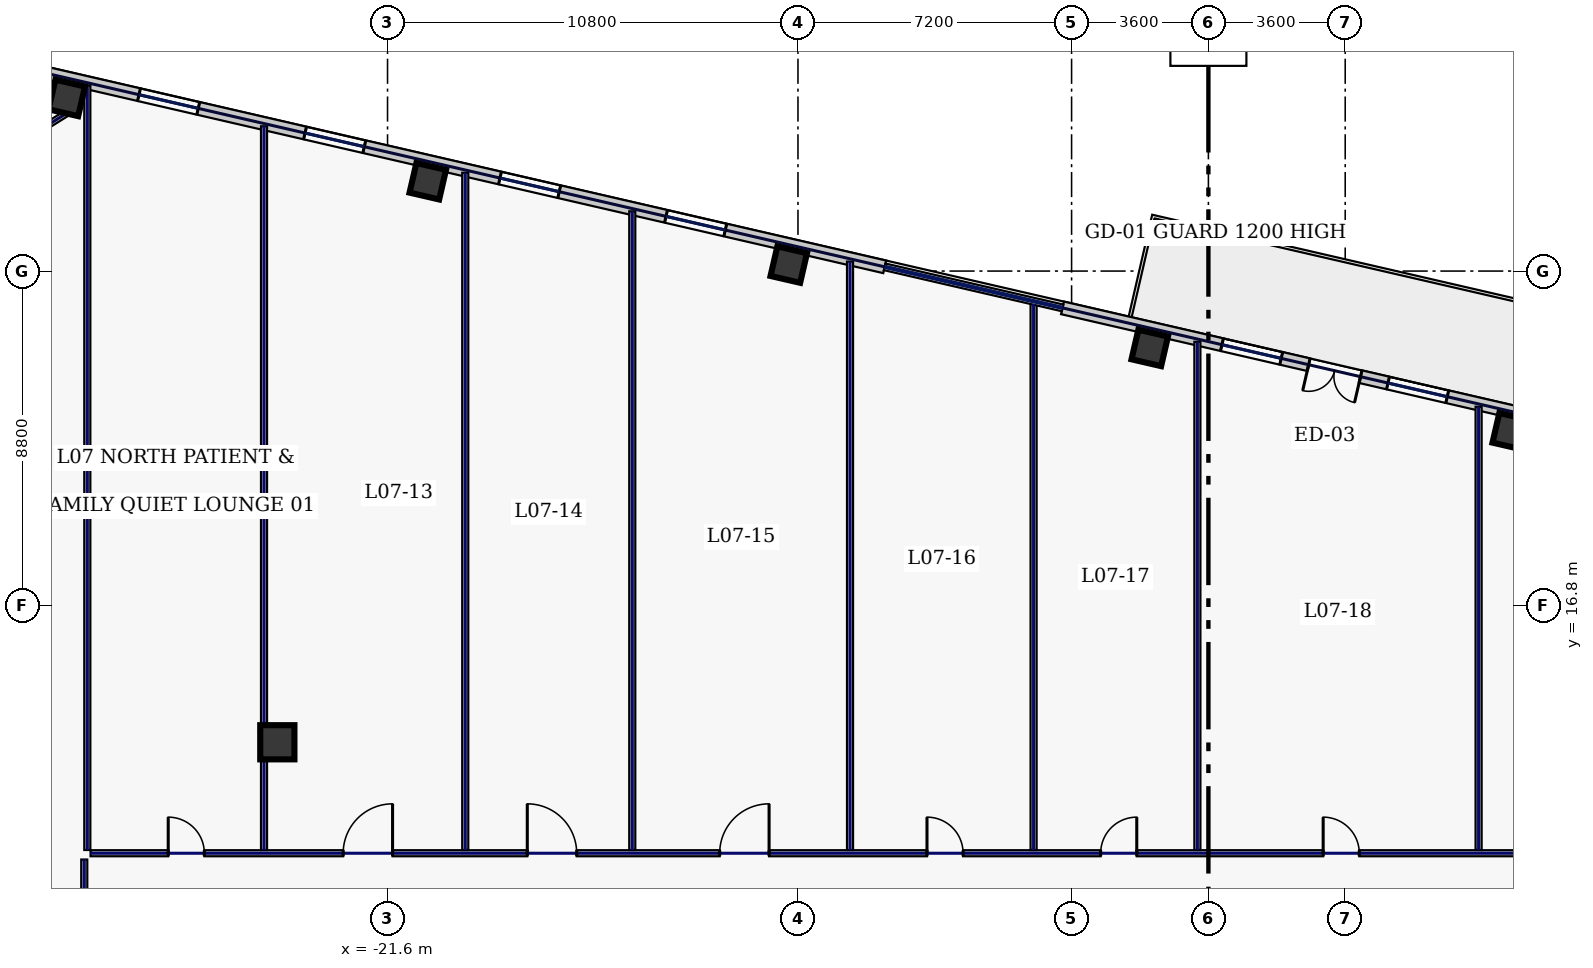
"""IFC4 building model, lengths in metres.
Left out: names, types, materials, properties, quantities, classifications, styles, units other than length and angle.
Written with IfcOpenShell. Run it as: python <this file> out.ifc"""

import sys

from ifc_helpers import new_model, si_unit, direction, frame, frame_2d, origin, origin_2d, place, context, subcontext, project, spatial, rectangle, hollow_rectangle, extrude, element, fill, save


model = new_model("IFC4")
c1 = context("Model", 3, precision=1e-05, world=origin(), true_north=direction((0.0, 1.0)))
c2 = subcontext(c1, "Body", "Model", "MODEL_VIEW")
j1 = project(units=[si_unit("LENGTHUNIT", "METRE"), si_unit("PLANEANGLEUNIT", "RADIAN")], contexts=[c1])
p1 = place(None, origin())
s1 = spatial("IfcSite", under=j1, at=p1, CompositionType="ELEMENT")
p2 = place(p1, origin())
s2 = spatial("IfcBuilding", under=s1, at=p2, CompositionType="ELEMENT")
p3 = place(p2, frame((0.0, 0.0, 39.4)))
s3 = spatial("IfcBuildingStorey", under=s2, at=p3, CompositionType="ELEMENT", Elevation=39.4)
p4 = place(p3, frame((-24.5, 13.2, 0.0), z_axis=(0.0, 0.0, 1.0), x_axis=(1.0, 0.0, 0.0)))
e1 = element("IfcColumn", 1, at=p4, inside=s3, PredefinedType="COLUMN", context=c2, shape_type="SweptSolid", body=[
    extrude(hollow_rectangle(XDim=0.9, YDim=0.9, WallThickness=0.04, at=origin_2d()), origin(), (0.0, 0.0, 1.0), 3.74),
])
for number, where, z_axis, x_axis in (
    (2, (7.955, 21.385, 0.0), (0.0, 0.0, 1.0), (0.974, -0.225, 0.0)),
    (3, (-1.544, 23.578, 0.0), (0.0, 0.0, 1.0), (0.974, -0.225, 0.0)),
    (4, (-11.042, 25.771, 0.0), (0.0, 0.0, 1.0), (0.974, -0.225, 0.0)),
    (5, (-20.541, 27.964, 0.0), (0.0, 0.0, 1.0), (0.974, -0.225, 0.0)),
    (6, (-30.04, 30.156, 0.0), (0.0, 0.0, 1.0), (0.974, -0.225, 0.0)),
):
    element("IfcColumn", number, at=place(p3, frame(where, z_axis=z_axis, x_axis=x_axis)), inside=s3, PredefinedType="COLUMN", context=c2, shape_type="SweptSolid", body=[
        extrude(hollow_rectangle(XDim=0.8, YDim=0.8, WallThickness=0.036, at=origin_2d()), origin(), (0.0, 0.0, 1.0), 3.74),
    ])
p5 = place(p3, frame((10.481, 21.325, 0.0), z_axis=(0.0, 0.0, 1.0), x_axis=(-0.974369353393, 0.2249541357, 0.0)))
e7 = element("IfcWall", 7, at=p5, inside=s3, PredefinedType="STANDARD", context=c2, shape_type="SweptSolid", body=[
    extrude(rectangle(XDim=14.697, YDim=0.34, at=frame_2d((7.349, 0.0))), origin(), (0.0, 0.0, 1.0), 3.74),
])
p6 = place(p5, frame((6.649, 0.0, 0.0)))
e8 = element("IfcOpeningElement", 8, at=p6, cuts=e7, PredefinedType="OPENING", context=c2, shape_type="SweptSolid", body=[
    extrude(rectangle(XDim=1.4, YDim=2.2, at=frame_2d((0.7, 1.1))), frame((0.0, 0.18, 0.0), z_axis=(0.0, -1.0, 0.0), x_axis=(1.0, 0.0, 0.0)), (0.0, 0.0, 1.0), 0.36),
])
p7 = place(p5, frame((8.791, 0.0, 0.22)))
e9 = element("IfcOpeningElement", 9, at=p7, cuts=e7, PredefinedType="OPENING", context=c2, shape_type="SweptSolid", body=[
    extrude(rectangle(XDim=1.6, YDim=1.2, at=frame_2d((0.8, 0.6))), frame((0.0, 0.18, 0.0), z_axis=(0.0, -1.0, 0.0), x_axis=(1.0, 0.0, 0.0)), (0.0, 0.0, 1.0), 0.36),
])
p8 = place(p5, frame((4.306, 0.0, 0.22)))
e10 = element("IfcOpeningElement", 10, at=p8, cuts=e7, PredefinedType="OPENING", context=c2, shape_type="SweptSolid", body=[
    extrude(rectangle(XDim=1.6, YDim=1.2, at=frame_2d((0.8, 0.6))), frame((0.0, 0.18, 0.0), z_axis=(0.0, -1.0, 0.0), x_axis=(1.0, 0.0, 0.0)), (0.0, 0.0, 1.0), 0.36),
])
p9 = place(p3, frame((-8.517, 25.711, 0.0), z_axis=(0.0, 0.0, 1.0), x_axis=(-0.974372845456, 0.224939009598, 0.0)))
e11 = element("IfcWall", 11, at=p9, inside=s3, PredefinedType="STANDARD", context=c2, shape_type="SweptSolid", body=[
    extrude(rectangle(XDim=22.652, YDim=0.34, at=frame_2d((11.326, 0.0))), origin(), (0.0, 0.0, 1.0), 3.74),
])
p10 = place(p9, frame((18.539, 0.0, 0.22)))
e12 = element("IfcOpeningElement", 12, at=p10, cuts=e11, PredefinedType="OPENING", context=c2, shape_type="SweptSolid", body=[
    extrude(rectangle(XDim=1.6, YDim=1.2, at=frame_2d((0.8, 0.6))), frame((0.0, 0.18, 0.0), z_axis=(0.0, -1.0, 0.0), x_axis=(1.0, 0.0, 0.0)), (0.0, 0.0, 1.0), 0.36),
])
p11 = place(p9, frame((14.055, 0.0, 0.22)))
e13 = element("IfcOpeningElement", 13, at=p11, cuts=e11, PredefinedType="OPENING", context=c2, shape_type="SweptSolid", body=[
    extrude(rectangle(XDim=1.6, YDim=1.2, at=frame_2d((0.8, 0.6))), frame((0.0, 0.18, 0.0), z_axis=(0.0, -1.0, 0.0), x_axis=(1.0, 0.0, 0.0)), (0.0, 0.0, 1.0), 0.36),
])
p12 = place(p9, frame((8.791, 0.0, 0.22)))
e14 = element("IfcOpeningElement", 14, at=p12, cuts=e11, PredefinedType="OPENING", context=c2, shape_type="SweptSolid", body=[
    extrude(rectangle(XDim=1.6, YDim=1.2, at=frame_2d((0.8, 0.6))), frame((0.0, 0.18, 0.0), z_axis=(0.0, -1.0, 0.0), x_axis=(1.0, 0.0, 0.0)), (0.0, 0.0, 1.0), 0.36),
])
p13 = place(p9, frame((4.306, 0.0, 0.22)))
e15 = element("IfcOpeningElement", 15, at=p13, cuts=e11, PredefinedType="OPENING", context=c2, shape_type="SweptSolid", body=[
    extrude(rectangle(XDim=1.6, YDim=1.2, at=frame_2d((0.8, 0.6))), frame((0.0, 0.18, 0.0), z_axis=(0.0, -1.0, 0.0), x_axis=(1.0, 0.0, 0.0)), (0.0, 0.0, 1.0), 0.36),
])
p14 = place(p3, frame((-29.86, 29.868, 0.0), z_axis=(0.0, 0.0, 1.0), x_axis=(-0.848043064089, -0.529927317139, 0.0)))
e16 = element("IfcWall", 16, at=p14, inside=s3, PredefinedType="PARTITIONING", context=c2, shape_type="SweptSolid", body=[
    extrude(rectangle(XDim=7.354, YDim=0.16, at=frame_2d((3.677, 0.0))), origin(), (0.0, 0.0, 1.0), 1.535),
])
p15 = place(p3, frame((-29.58, -10.015, 0.0), z_axis=(0.0, 0.0, 1.0), x_axis=(0.0, 1.0, 0.0)))
e17 = element("IfcWall", 17, at=p15, inside=s3, PredefinedType="PARTITIONING", context=c2, shape_type="SweptSolid", body=[
    extrude(rectangle(XDim=20.13, YDim=0.16, at=frame_2d((10.065, 0.0))), origin(), (0.0, 0.0, 1.0), 3.74),
])
p16 = place(p15, frame((2.169, 0.0, 0.0)))
e18 = element("IfcOpeningElement", 18, at=p16, cuts=e17, PredefinedType="OPENING", context=c2, shape_type="SweptSolid", body=[
    extrude(rectangle(XDim=0.95, YDim=2.2, at=frame_2d((0.475, 1.1))), frame((0.0, 0.09, 0.0), z_axis=(0.0, -1.0, 0.0), x_axis=(1.0, 0.0, 0.0)), (0.0, 0.0, 1.0), 0.18),
])
p17 = place(p15, frame((7.025, 0.0, 0.0)))
e19 = element("IfcOpeningElement", 19, at=p17, cuts=e17, PredefinedType="OPENING", context=c2, shape_type="SweptSolid", body=[
    extrude(rectangle(XDim=0.95, YDim=2.2, at=frame_2d((0.475, 1.1))), frame((0.0, 0.09, 0.0), z_axis=(0.0, -1.0, 0.0), x_axis=(1.0, 0.0, 0.0)), (0.0, 0.0, 1.0), 0.18),
])
p18 = place(p15, frame((12.225, 0.0, 0.0)))
e20 = element("IfcOpeningElement", 20, at=p18, cuts=e17, PredefinedType="OPENING", context=c2, shape_type="SweptSolid", body=[
    extrude(rectangle(XDim=0.95, YDim=2.2, at=frame_2d((0.475, 1.1))), frame((0.0, 0.09, 0.0), z_axis=(0.0, -1.0, 0.0), x_axis=(1.0, 0.0, 0.0)), (0.0, 0.0, 1.0), 0.18),
])
p19 = place(p15, frame((17.131, 0.0, 0.0)))
e21 = element("IfcOpeningElement", 21, at=p19, cuts=e17, PredefinedType="OPENING", context=c2, shape_type="SweptSolid", body=[
    extrude(rectangle(XDim=0.95, YDim=2.2, at=frame_2d((0.475, 1.1))), frame((0.0, 0.09, 0.0), z_axis=(0.0, -1.0, 0.0), x_axis=(1.0, 0.0, 0.0)), (0.0, 0.0, 1.0), 0.18),
])
p20 = place(p3, frame((-29.415, 10.28, 0.0), z_axis=(0.0, 0.0, 1.0), x_axis=(1.0, 0.0, 0.0)))
e22 = element("IfcWall", 22, at=p20, inside=s3, PredefinedType="PARTITIONING", context=c2, shape_type="SweptSolid", body=[
    extrude(rectangle(XDim=58.83, YDim=0.16, at=frame_2d((29.415, 0.0))), origin(), (0.0, 0.0, 1.0), 3.74),
])
p21 = place(p20, frame((2.044, 0.0, 0.0)))
e23 = element("IfcOpeningElement", 23, at=p21, cuts=e22, PredefinedType="OPENING", context=c2, shape_type="SweptSolid", body=[
    extrude(rectangle(XDim=0.95, YDim=2.2, at=frame_2d((0.475, 1.1))), frame((0.0, 0.09, 0.0), z_axis=(0.0, -1.0, 0.0), x_axis=(1.0, 0.0, 0.0)), (0.0, 0.0, 1.0), 0.18),
])
p22 = place(p20, frame((6.647, 0.0, 0.0)))
e24 = element("IfcOpeningElement", 24, at=p22, cuts=e22, PredefinedType="OPENING", context=c2, shape_type="SweptSolid", body=[
    extrude(rectangle(XDim=1.3, YDim=2.2, at=frame_2d((0.65, 1.1))), frame((0.0, 0.09, 0.0), z_axis=(0.0, -1.0, 0.0), x_axis=(1.0, 0.0, 0.0)), (0.0, 0.0, 1.0), 0.18),
])
p23 = place(p20, frame((11.492, 0.0, 0.0)))
e25 = element("IfcOpeningElement", 25, at=p23, cuts=e22, PredefinedType="OPENING", context=c2, shape_type="SweptSolid", body=[
    extrude(rectangle(XDim=1.3, YDim=2.2, at=frame_2d((0.65, 1.1))), frame((0.0, 0.09, 0.0), z_axis=(0.0, -1.0, 0.0), x_axis=(1.0, 0.0, 0.0)), (0.0, 0.0, 1.0), 0.18),
])
p24 = place(p20, frame((16.555, 0.0, 0.0)))
e26 = element("IfcOpeningElement", 26, at=p24, cuts=e22, PredefinedType="OPENING", context=c2, shape_type="SweptSolid", body=[
    extrude(rectangle(XDim=1.3, YDim=2.2, at=frame_2d((0.65, 1.1))), frame((0.0, 0.09, 0.0), z_axis=(0.0, -1.0, 0.0), x_axis=(1.0, 0.0, 0.0)), (0.0, 0.0, 1.0), 0.18),
])
p25 = place(p20, frame((22.01, 0.0, 0.0)))
e27 = element("IfcOpeningElement", 27, at=p25, cuts=e22, PredefinedType="OPENING", context=c2, shape_type="SweptSolid", body=[
    extrude(rectangle(XDim=0.95, YDim=2.2, at=frame_2d((0.475, 1.1))), frame((0.0, 0.09, 0.0), z_axis=(0.0, -1.0, 0.0), x_axis=(1.0, 0.0, 0.0)), (0.0, 0.0, 1.0), 0.18),
])
p26 = place(p20, frame((26.58, 0.0, 0.0)))
e28 = element("IfcOpeningElement", 28, at=p26, cuts=e22, PredefinedType="OPENING", context=c2, shape_type="SweptSolid", body=[
    extrude(rectangle(XDim=0.95, YDim=2.2, at=frame_2d((0.475, 1.1))), frame((0.0, 0.09, 0.0), z_axis=(0.0, -1.0, 0.0), x_axis=(1.0, 0.0, 0.0)), (0.0, 0.0, 1.0), 0.18),
])
p27 = place(p20, frame((32.435, 0.0, 0.0)))
e29 = element("IfcOpeningElement", 29, at=p27, cuts=e22, PredefinedType="OPENING", context=c2, shape_type="SweptSolid", body=[
    extrude(rectangle(XDim=0.95, YDim=2.2, at=frame_2d((0.475, 1.1))), frame((0.0, 0.09, 0.0), z_axis=(0.0, -1.0, 0.0), x_axis=(1.0, 0.0, 0.0)), (0.0, 0.0, 1.0), 0.18),
])
p28 = place(p20, frame((41.18, 0.0, 0.0)))
e30 = element("IfcOpeningElement", 30, at=p28, cuts=e22, PredefinedType="OPENING", context=c2, shape_type="SweptSolid", body=[
    extrude(rectangle(XDim=1.05, YDim=2.2, at=frame_2d((0.525, 1.1))), frame((0.0, 0.09, 0.0), z_axis=(0.0, -1.0, 0.0), x_axis=(1.0, 0.0, 0.0)), (0.0, 0.0, 1.0), 0.18),
])
p29 = place(p20, frame((50.025, 0.0, 0.0)))
e31 = element("IfcOpeningElement", 31, at=p29, cuts=e22, PredefinedType="OPENING", context=c2, shape_type="SweptSolid", body=[
    extrude(rectangle(XDim=0.95, YDim=2.2, at=frame_2d((0.475, 1.1))), frame((0.0, 0.09, 0.0), z_axis=(0.0, -1.0, 0.0), x_axis=(1.0, 0.0, 0.0)), (0.0, 0.0, 1.0), 0.18),
])
p30 = place(p20, frame((55.981, 0.0, 0.0)))
e32 = element("IfcOpeningElement", 32, at=p30, cuts=e22, PredefinedType="OPENING", context=c2, shape_type="SweptSolid", body=[
    extrude(rectangle(XDim=0.95, YDim=2.2, at=frame_2d((0.475, 1.1))), frame((0.0, 0.09, 0.0), z_axis=(0.0, -1.0, 0.0), x_axis=(1.0, 0.0, 0.0)), (0.0, 0.0, 1.0), 0.18),
])
p31 = place(p3, frame((-29.5, 10.365, 0.0), z_axis=(0.0, 0.0, 1.0), x_axis=(0.0, 1.0, 0.0)))
e33 = element("IfcWall", 33, at=p31, inside=s3, PredefinedType="PARTITIONING", context=c2, shape_type="SweptSolid", body=[
    extrude(rectangle(XDim=20.119, YDim=0.16, at=frame_2d((10.059, 0.0))), origin(), (0.0, 0.0, 1.0), 3.74),
])
p32 = place(p3, frame((-24.85, 10.365, 0.0), z_axis=(0.0, 0.0, 1.0), x_axis=(0.0, 1.0, 0.0)))
e34 = element("IfcWall", 34, at=p32, inside=s3, PredefinedType="PARTITIONING", context=c2, shape_type="SweptSolid", body=[
    extrude(rectangle(XDim=19.045, YDim=0.16, at=frame_2d((9.522, 0.0))), origin(), (0.0, 0.0, 1.0), 3.74),
])
p33 = place(p3, frame((-15.16, 10.365, 0.0), z_axis=(0.0, 0.0, 1.0), x_axis=(0.0, 1.0, 0.0)))
e35 = element("IfcWall", 35, at=p33, inside=s3, PredefinedType="PARTITIONING", context=c2, shape_type="SweptSolid", body=[
    extrude(rectangle(XDim=16.808, YDim=0.16, at=frame_2d((8.404, 0.0))), origin(), (0.0, 0.0, 1.0), 3.74),
])
p34 = place(p3, frame((-4.6, 10.365, 0.0), z_axis=(0.0, 0.0, 1.0), x_axis=(0.0, 1.0, 0.0)))
e36 = element("IfcWall", 36, at=p34, inside=s3, PredefinedType="PARTITIONING", context=c2, shape_type="SweptSolid", body=[
    extrude(rectangle(XDim=14.37, YDim=0.16, at=frame_2d((7.185, 0.0))), origin(), (0.0, 0.0, 1.0), 3.74),
])
p35 = place(p3, frame((-0.29, 10.365, 0.0), z_axis=(0.0, 0.0, 1.0), x_axis=(0.0, 1.0, 0.0)))
e37 = element("IfcWall", 37, at=p35, inside=s3, PredefinedType="PARTITIONING", context=c2, shape_type="SweptSolid", body=[
    extrude(rectangle(XDim=13.375, YDim=0.16, at=frame_2d((6.688, 0.0))), origin(), (0.0, 0.0, 1.0), 3.74),
])
p36 = place(p3, frame((7.11, 10.365, 0.0), z_axis=(0.0, 0.0, 1.0), x_axis=(0.0, 1.0, 0.0)))
e38 = element("IfcWall", 38, at=p36, inside=s3, PredefinedType="PARTITIONING", context=c2, shape_type="SweptSolid", body=[
    extrude(rectangle(XDim=11.667, YDim=0.16, at=frame_2d((5.833, 0.0))), origin(), (0.0, 0.0, 1.0), 3.74),
])
p37 = place(p3, frame((-19.555, 10.365, 0.0), z_axis=(0.0, 0.0, 1.0), x_axis=(0.0, 1.0, 0.0)))
e39 = element("IfcWall", 39, at=p37, inside=s3, PredefinedType="PARTITIONING", context=c2, shape_type="SweptSolid", body=[
    extrude(rectangle(XDim=17.823, YDim=0.16, at=frame_2d((8.911, 0.0))), origin(), (0.0, 0.0, 1.0), 3.74),
])
p38 = place(p3, frame((-9.43, 10.365, 0.0), z_axis=(0.0, 0.0, 1.0), x_axis=(0.0, 1.0, 0.0)))
e40 = element("IfcWall", 40, at=p38, inside=s3, PredefinedType="PARTITIONING", context=c2, shape_type="SweptSolid", body=[
    extrude(rectangle(XDim=15.485, YDim=0.16, at=frame_2d((7.743, 0.0))), origin(), (0.0, 0.0, 1.0), 3.74),
])
p39 = place(p6, origin())
e41 = element("IfcDoor", 41, at=p39, inside=s3, OperationType="DOUBLE_SWING_LEFT", PredefinedType="DOOR", context=c2, shape_type="SweptSolid", body=[
    extrude(rectangle(XDim=1.4, YDim=2.2, at=frame_2d((0.7, 1.1))), frame((0.0, 0.025, 0.0), z_axis=(0.0, -1.0, 0.0), x_axis=(1.0, 0.0, 0.0)), (0.0, 0.0, 1.0), 0.05),
])
fill(e8, e41)
p40 = place(p7, origin())
e42 = element("IfcWindow", 42, at=p40, inside=s3, PartitioningType="SINGLE_PANEL", PredefinedType="WINDOW", context=c2, shape_type="SweptSolid", body=[
    extrude(rectangle(XDim=1.6, YDim=1.2, at=frame_2d((0.8, 0.6))), frame((0.0, 0.03, 0.0), z_axis=(0.0, -1.0, 0.0), x_axis=(1.0, 0.0, 0.0)), (0.0, 0.0, 1.0), 0.06),
])
fill(e9, e42)
p41 = place(p8, origin())
e43 = element("IfcWindow", 43, at=p41, inside=s3, PartitioningType="SINGLE_PANEL", PredefinedType="WINDOW", context=c2, shape_type="SweptSolid", body=[
    extrude(rectangle(XDim=1.6, YDim=1.2, at=frame_2d((0.8, 0.6))), frame((0.0, 0.03, 0.0), z_axis=(0.0, -1.0, 0.0), x_axis=(1.0, 0.0, 0.0)), (0.0, 0.0, 1.0), 0.06),
])
fill(e10, e43)
p42 = place(p10, origin())
e44 = element("IfcWindow", 44, at=p42, inside=s3, PartitioningType="SINGLE_PANEL", PredefinedType="WINDOW", context=c2, shape_type="SweptSolid", body=[
    extrude(rectangle(XDim=1.6, YDim=1.2, at=frame_2d((0.8, 0.6))), frame((0.0, 0.03, 0.0), z_axis=(0.0, -1.0, 0.0), x_axis=(1.0, 0.0, 0.0)), (0.0, 0.0, 1.0), 0.06),
])
fill(e12, e44)
p43 = place(p11, origin())
e45 = element("IfcWindow", 45, at=p43, inside=s3, PartitioningType="SINGLE_PANEL", PredefinedType="WINDOW", context=c2, shape_type="SweptSolid", body=[
    extrude(rectangle(XDim=1.6, YDim=1.2, at=frame_2d((0.8, 0.6))), frame((0.0, 0.03, 0.0), z_axis=(0.0, -1.0, 0.0), x_axis=(1.0, 0.0, 0.0)), (0.0, 0.0, 1.0), 0.06),
])
fill(e13, e45)
p44 = place(p12, origin())
e46 = element("IfcWindow", 46, at=p44, inside=s3, PartitioningType="SINGLE_PANEL", PredefinedType="WINDOW", context=c2, shape_type="SweptSolid", body=[
    extrude(rectangle(XDim=1.6, YDim=1.2, at=frame_2d((0.8, 0.6))), frame((0.0, 0.03, 0.0), z_axis=(0.0, -1.0, 0.0), x_axis=(1.0, 0.0, 0.0)), (0.0, 0.0, 1.0), 0.06),
])
fill(e14, e46)
p45 = place(p13, origin())
e47 = element("IfcWindow", 47, at=p45, inside=s3, PartitioningType="SINGLE_PANEL", PredefinedType="WINDOW", context=c2, shape_type="SweptSolid", body=[
    extrude(rectangle(XDim=1.6, YDim=1.2, at=frame_2d((0.8, 0.6))), frame((0.0, 0.03, 0.0), z_axis=(0.0, -1.0, 0.0), x_axis=(1.0, 0.0, 0.0)), (0.0, 0.0, 1.0), 0.06),
])
fill(e15, e47)
p46 = place(p21, origin())
e48 = element("IfcDoor", 48, at=p46, inside=s3, OperationType="SINGLE_SWING_LEFT", PredefinedType="DOOR", context=c2, shape_type="SweptSolid", body=[
    extrude(rectangle(XDim=0.95, YDim=2.2, at=frame_2d((0.475, 1.1))), frame((0.0, 0.025, 0.0), z_axis=(0.0, -1.0, 0.0), x_axis=(1.0, 0.0, 0.0)), (0.0, 0.0, 1.0), 0.05),
])
fill(e23, e48)
p47 = place(p22, origin())
e49 = element("IfcDoor", 49, at=p47, inside=s3, OperationType="SINGLE_SWING_RIGHT", PredefinedType="DOOR", context=c2, shape_type="SweptSolid", body=[
    extrude(rectangle(XDim=1.3, YDim=2.2, at=frame_2d((0.65, 1.1))), frame((0.0, 0.025, 0.0), z_axis=(0.0, -1.0, 0.0), x_axis=(1.0, 0.0, 0.0)), (0.0, 0.0, 1.0), 0.05),
])
fill(e24, e49)
p48 = place(p23, origin())
e50 = element("IfcDoor", 50, at=p48, inside=s3, OperationType="SINGLE_SWING_LEFT", PredefinedType="DOOR", context=c2, shape_type="SweptSolid", body=[
    extrude(rectangle(XDim=1.3, YDim=2.2, at=frame_2d((0.65, 1.1))), frame((0.0, 0.025, 0.0), z_axis=(0.0, -1.0, 0.0), x_axis=(1.0, 0.0, 0.0)), (0.0, 0.0, 1.0), 0.05),
])
fill(e25, e50)
p49 = place(p24, origin())
e51 = element("IfcDoor", 51, at=p49, inside=s3, OperationType="SINGLE_SWING_RIGHT", PredefinedType="DOOR", context=c2, shape_type="SweptSolid", body=[
    extrude(rectangle(XDim=1.3, YDim=2.2, at=frame_2d((0.65, 1.1))), frame((0.0, 0.025, 0.0), z_axis=(0.0, -1.0, 0.0), x_axis=(1.0, 0.0, 0.0)), (0.0, 0.0, 1.0), 0.05),
])
fill(e26, e51)
p50 = place(p25, origin())
e52 = element("IfcDoor", 52, at=p50, inside=s3, OperationType="SINGLE_SWING_LEFT", PredefinedType="DOOR", context=c2, shape_type="SweptSolid", body=[
    extrude(rectangle(XDim=0.95, YDim=2.2, at=frame_2d((0.475, 1.1))), frame((0.0, 0.025, 0.0), z_axis=(0.0, -1.0, 0.0), x_axis=(1.0, 0.0, 0.0)), (0.0, 0.0, 1.0), 0.05),
])
fill(e27, e52)
p51 = place(p26, origin())
e53 = element("IfcDoor", 53, at=p51, inside=s3, OperationType="SINGLE_SWING_RIGHT", PredefinedType="DOOR", context=c2, shape_type="SweptSolid", body=[
    extrude(rectangle(XDim=0.95, YDim=2.2, at=frame_2d((0.475, 1.1))), frame((0.0, 0.025, 0.0), z_axis=(0.0, -1.0, 0.0), x_axis=(1.0, 0.0, 0.0)), (0.0, 0.0, 1.0), 0.05),
])
fill(e28, e53)
p52 = place(p27, origin())
e54 = element("IfcDoor", 54, at=p52, inside=s3, OperationType="SINGLE_SWING_LEFT", PredefinedType="DOOR", context=c2, shape_type="SweptSolid", body=[
    extrude(rectangle(XDim=0.95, YDim=2.2, at=frame_2d((0.475, 1.1))), frame((0.0, 0.025, 0.0), z_axis=(0.0, -1.0, 0.0), x_axis=(1.0, 0.0, 0.0)), (0.0, 0.0, 1.0), 0.05),
])
fill(e29, e54)
save(model, sys.argv[1])
